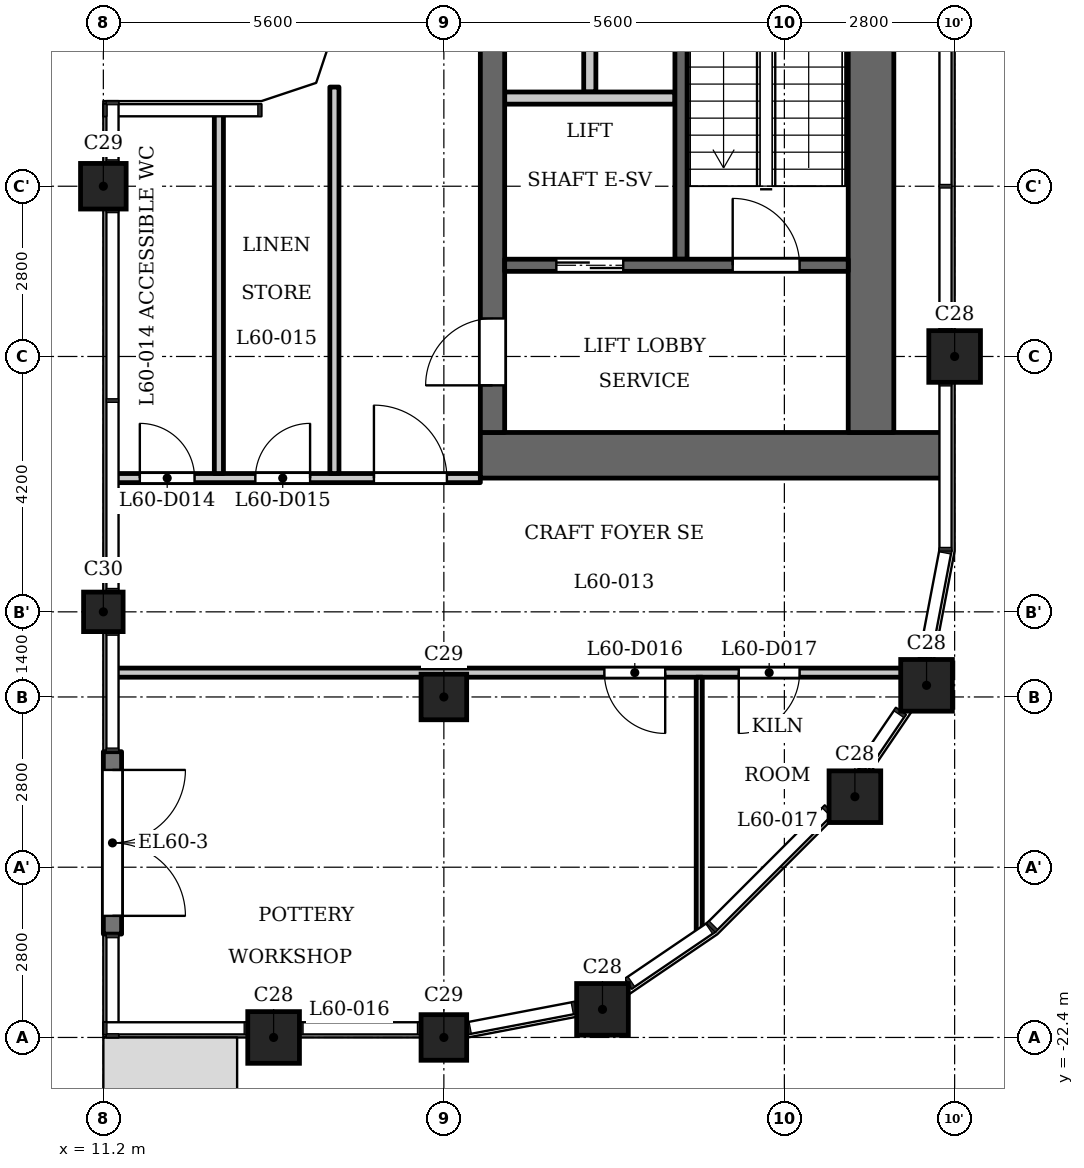
"""IFC4 building model, lengths in metres.
Left out: names, types, materials, properties, quantities, classifications, styles, units other than length and angle.
Written with IfcOpenShell. Run it as: python <this file> out.ifc"""

import sys

from ifc_helpers import new_model, si_unit, direction, frame, frame_2d, origin, origin_2d, place, context, subcontext, project, spatial, polyline, rectangle, outline, extrude, element, fill, save


model = new_model("IFC4")
c1 = context("Model", 3, precision=1e-05, world=origin(), true_north=direction((0.0, 1.0)))
c2 = subcontext(c1, "Body", "Model", "MODEL_VIEW")
j1 = project(units=[si_unit("LENGTHUNIT", "METRE"), si_unit("PLANEANGLEUNIT", "RADIAN")], contexts=[c1])
p1 = place(None, origin())
s1 = spatial("IfcSite", under=j1, at=p1, CompositionType="ELEMENT")
p2 = place(p1, origin())
s2 = spatial("IfcBuilding", under=s1, at=p2, CompositionType="ELEMENT")
p3 = place(p2, frame((0.0, 0.0, 230.9)))
s3 = spatial("IfcBuildingStorey", under=s2, at=p3, CompositionType="ELEMENT", Elevation=230.9)
for number, where, z_axis, x_axis in (
    (1, (14.0, -22.4, 0.0), (0.0, 0.0, 1.0), (1.0, 0.0, 0.0)),
    (2, (19.409, -21.938, 0.0), (0.0, 0.0, 1.0), (1.0, 0.0, 0.0)),
    (3, (23.56, -18.44, 0.0), (0.0, 0.0, 1.0), (1.0, 0.0, 0.0)),
    (4, (24.738, -16.609, 0.0), (0.0, 0.0, 1.0), (1.0, 0.0, 0.0)),
    (5, (25.2, -11.2, 0.0), (0.0, 0.0, 1.0), (1.0, 0.0, 0.0)),
):
    element("IfcColumn", number, at=place(p3, frame(where, z_axis=z_axis, x_axis=x_axis)), inside=s3, PredefinedType="COLUMN", context=c2, shape_type="SweptSolid", body=[
        extrude(rectangle(XDim=0.85, YDim=0.85, at=origin_2d()), origin(), (0.0, 0.0, 1.0), 5.4),
    ])
for number, where, z_axis, x_axis in (
    (6, (16.8, -22.4, 0.0), (0.0, 0.0, 1.0), (1.0, 0.0, 0.0)),
    (7, (16.8, -16.8, 0.0), (0.0, 0.0, 1.0), (1.0, 0.0, 0.0)),
    (8, (11.2, -8.4, 0.0), (0.0, 0.0, 1.0), (1.0, 0.0, 0.0)),
):
    element("IfcColumn", number, at=place(p3, frame(where, z_axis=z_axis, x_axis=x_axis)), inside=s3, PredefinedType="COLUMN", context=c2, shape_type="SweptSolid", body=[
        extrude(rectangle(XDim=0.75, YDim=0.75, at=origin_2d()), origin(), (0.0, 0.0, 1.0), 5.4),
    ])
p4 = place(p3, frame((11.2, -15.4, 0.0), z_axis=(0.0, 0.0, 1.0), x_axis=(1.0, 0.0, 0.0)))
e9 = element("IfcColumn", 9, at=p4, inside=s3, PredefinedType="COLUMN", context=c2, shape_type="SweptSolid", body=[
    extrude(rectangle(XDim=0.65, YDim=0.65, at=origin_2d()), origin(), (0.0, 0.0, 1.0), 5.4),
])
p5 = place(p3, frame((11.35, -17.7, 0.0), z_axis=(0.0, 0.0, 1.0), x_axis=(0.0, -1.0, 0.0)))
e10 = element("IfcWall", 10, at=p5, inside=s3, PredefinedType="SOLIDWALL", context=c2, shape_type="SweptSolid", body=[
    extrude(rectangle(XDim=3.0, YDim=0.3, at=frame_2d((1.5, 0.0))), origin(), (0.0, 0.0, 1.0), 4.95),
])
p6 = place(p5, frame((0.3, 0.0, 0.0)))
e11 = element("IfcOpeningElement", 11, at=p6, cuts=e10, PredefinedType="OPENING", context=c2, shape_type="SweptSolid", body=[
    extrude(rectangle(XDim=2.4, YDim=2.3, at=frame_2d((1.2, 1.15))), frame((0.0, 0.16, 0.0), z_axis=(0.0, -1.0, 0.0), x_axis=(1.0, 0.0, 0.0)), (0.0, 0.0, 1.0), 0.32),
])
p7 = place(p3, frame((20.7, -9.6, 0.0), z_axis=(0.0, 0.0, 1.0), x_axis=(0.0, 1.0, 0.0)))
e12 = element("IfcWall", 12, at=p7, inside=s3, PredefinedType="SHEAR", context=c2, shape_type="SweptSolid", body=[
    extrude(rectangle(XDim=9.75, YDim=0.2, at=frame_2d((4.875, 0.0))), origin(), (0.0, 0.0, 1.0), 4.95),
])
p8 = place(p3, frame((17.4, -12.825, 0.0), z_axis=(0.0, 0.0, 1.0), x_axis=(1.0, 0.0, 0.0)))
e13 = element("IfcWall", 13, at=p8, inside=s3, PredefinedType="SHEAR", context=c2, shape_type="SweptSolid", body=[
    extrude(rectangle(XDim=7.6, YDim=0.75, at=frame_2d((3.8, 0.0))), origin(), (0.0, 0.0, 1.0), 4.95),
])
p9 = place(p3, frame((19.2, -6.85, 0.0), z_axis=(0.0, 0.0, 1.0), x_axis=(0.0, 1.0, 0.0)))
e14 = element("IfcWall", 14, at=p9, inside=s3, PredefinedType="PARTITIONING", context=c2, shape_type="SweptSolid", body=[
    extrude(rectangle(XDim=7.0, YDim=0.2, at=frame_2d((3.5, 0.0))), origin(), (0.0, 0.0, 1.0), 4.95),
])
p10 = place(p3, frame((17.6, -12.45, 0.0), z_axis=(0.0, 0.0, 1.0), x_axis=(0.0, 1.0, 0.0)))
e15 = element("IfcWall", 15, at=p10, inside=s3, PredefinedType="SHEAR", context=c2, shape_type="SweptSolid", body=[
    extrude(rectangle(XDim=24.9, YDim=0.4, at=frame_2d((12.45, 0.0))), origin(), (0.0, 0.0, 1.0), 4.95),
])
p11 = place(p10, frame((8.65, 0.0, 0.0)))
e16 = element("IfcOpeningElement", 16, at=p11, cuts=e15, PredefinedType="OPENING", context=c2, shape_type="SweptSolid", body=[
    extrude(rectangle(XDim=0.9, YDim=2.1, at=frame_2d((0.45, 1.05))), frame((0.0, 0.21, 0.0), z_axis=(0.0, -1.0, 0.0), x_axis=(1.0, 0.0, 0.0)), (0.0, 0.0, 1.0), 0.42),
])
p12 = place(p10, frame((15.6, 0.0, 0.0)))
e17 = element("IfcOpeningElement", 17, at=p12, cuts=e15, PredefinedType="OPENING", context=c2, shape_type="SweptSolid", body=[
    extrude(rectangle(XDim=1.1, YDim=2.1, at=frame_2d((0.55, 1.05))), frame((0.0, 0.21, 0.0), z_axis=(0.0, -1.0, 0.0), x_axis=(1.0, 0.0, 0.0)), (0.0, 0.0, 1.0), 0.42),
])
p13 = place(p10, frame((18.0, 0.0, 0.0)))
e18 = element("IfcOpeningElement", 18, at=p13, cuts=e15, PredefinedType="OPENING", context=c2, shape_type="SweptSolid", body=[
    extrude(rectangle(XDim=1.1, YDim=2.1, at=frame_2d((0.55, 1.05))), frame((0.0, 0.21, 0.0), z_axis=(0.0, -1.0, 0.0), x_axis=(1.0, 0.0, 0.0)), (0.0, 0.0, 1.0), 0.42),
])
p14 = place(p10, frame((23.025, 0.0, 0.0)))
e19 = element("IfcOpeningElement", 19, at=p14, cuts=e15, PredefinedType="OPENING", context=c2, shape_type="SweptSolid", body=[
    extrude(rectangle(XDim=1.1, YDim=2.1, at=frame_2d((0.55, 1.05))), frame((0.0, 0.21, 0.0), z_axis=(0.0, -1.0, 0.0), x_axis=(1.0, 0.0, 0.0)), (0.0, 0.0, 1.0), 0.42),
])
p15 = place(p10, frame((0.775, 0.0, 0.0)))
e20 = element("IfcOpeningElement", 20, at=p15, cuts=e15, PredefinedType="OPENING", context=c2, shape_type="SweptSolid", body=[
    extrude(rectangle(XDim=1.1, YDim=2.1, at=frame_2d((0.55, 1.05))), frame((0.0, 0.21, 0.0), z_axis=(0.0, -1.0, 0.0), x_axis=(1.0, 0.0, 0.0)), (0.0, 0.0, 1.0), 0.42),
])
p16 = place(p10, frame((12.925, 0.0, 0.0)))
e21 = element("IfcOpeningElement", 21, at=p16, cuts=e15, PredefinedType="OPENING", context=c2, shape_type="SweptSolid", body=[
    extrude(rectangle(XDim=1.8, YDim=2.1, at=frame_2d((0.9, 1.05))), frame((0.0, 0.21, 0.0), z_axis=(0.0, -1.0, 0.0), x_axis=(1.0, 0.0, 0.0)), (0.0, 0.0, 1.0), 0.42),
])
p17 = place(p3, frame((23.825, -12.45, 0.0), z_axis=(0.0, 0.0, 1.0), x_axis=(0.0, 1.0, 0.0)))
e22 = element("IfcWall", 22, at=p17, inside=s3, PredefinedType="SHEAR", context=c2, shape_type="SweptSolid", body=[
    extrude(rectangle(XDim=24.9, YDim=0.75, at=frame_2d((12.45, 0.0))), origin(), (0.0, 0.0, 1.0), 4.95),
])
p18 = place(p3, frame((17.8, -9.7, 0.0), z_axis=(0.0, 0.0, 1.0), x_axis=(1.0, 0.0, 0.0)))
e23 = element("IfcWall", 23, at=p18, inside=s3, PredefinedType="SHEAR", context=c2, shape_type="SweptSolid", body=[
    extrude(rectangle(XDim=5.65, YDim=0.2, at=frame_2d((2.825, 0.0))), origin(), (0.0, 0.0, 1.0), 4.95),
])
p19 = place(p18, frame((0.85, 0.0, 0.0)))
e24 = element("IfcOpeningElement", 24, at=p19, cuts=e23, PredefinedType="OPENING", context=c2, shape_type="SweptSolid", body=[
    extrude(rectangle(XDim=1.1, YDim=2.1, at=frame_2d((0.55, 1.05))), frame((0.0, 0.11, 0.0), z_axis=(0.0, -1.0, 0.0), x_axis=(1.0, 0.0, 0.0)), (0.0, 0.0, 1.0), 0.22),
])
p20 = place(p18, frame((3.75, 0.0, 0.0)))
e25 = element("IfcOpeningElement", 25, at=p20, cuts=e23, PredefinedType="OPENING", context=c2, shape_type="SweptSolid", body=[
    extrude(rectangle(XDim=1.1, YDim=2.1, at=frame_2d((0.55, 1.05))), frame((0.0, 0.11, 0.0), z_axis=(0.0, -1.0, 0.0), x_axis=(1.0, 0.0, 0.0)), (0.0, 0.0, 1.0), 0.22),
])
p21 = place(p3, frame((17.8, -6.95, 0.0), z_axis=(0.0, 0.0, 1.0), x_axis=(1.0, 0.0, 0.0)))
e26 = element("IfcWall", 26, at=p21, inside=s3, PredefinedType="PARTITIONING", context=c2, shape_type="SweptSolid", body=[
    extrude(rectangle(XDim=2.8, YDim=0.2, at=frame_2d((1.4, 0.0))), origin(), (0.0, 0.0, 1.0), 4.95),
])
p22 = place(p3, frame((11.384, -16.4, 0.0), z_axis=(0.0, 0.0, 1.0), x_axis=(1.0, 0.0, 0.0)))
e27 = element("IfcWall", 27, at=p22, inside=s3, PredefinedType="PARTITIONING", context=c2, shape_type="SweptSolid", body=[
    extrude(rectangle(XDim=13.336, YDim=0.15, at=frame_2d((6.668, 0.0))), origin(), (0.0, 0.0, 1.0), 4.95),
])
p23 = place(p22, frame((8.056, 0.0, 0.0)))
e28 = element("IfcOpeningElement", 28, at=p23, cuts=e27, PredefinedType="OPENING", context=c2, shape_type="SweptSolid", body=[
    extrude(rectangle(XDim=1.0, YDim=2.1, at=frame_2d((0.5, 1.05))), frame((0.0, 0.085, 0.0), z_axis=(0.0, -1.0, 0.0), x_axis=(1.0, 0.0, 0.0)), (0.0, 0.0, 1.0), 0.17),
])
p24 = place(p22, frame((10.266, 0.0, 0.0)))
e29 = element("IfcOpeningElement", 29, at=p24, cuts=e27, PredefinedType="OPENING", context=c2, shape_type="SweptSolid", body=[
    extrude(rectangle(XDim=1.0, YDim=2.1, at=frame_2d((0.5, 1.05))), frame((0.0, 0.085, 0.0), z_axis=(0.0, -1.0, 0.0), x_axis=(1.0, 0.0, 0.0)), (0.0, 0.0, 1.0), 0.17),
])
p25 = place(p3, frame((11.384, -13.2, 0.0), z_axis=(0.0, 0.0, 1.0), x_axis=(1.0, 0.0, 0.0)))
e30 = element("IfcWall", 30, at=p25, inside=s3, PredefinedType="PARTITIONING", context=c2, shape_type="SweptSolid", body=[
    extrude(rectangle(XDim=6.016, YDim=0.15, at=frame_2d((3.008, 0.0))), origin(), (0.0, 0.0, 1.0), 4.95),
])
p26 = place(p25, frame((4.266, 0.0, 0.0)))
e31 = element("IfcOpeningElement", 31, at=p26, cuts=e30, PredefinedType="OPENING", context=c2, shape_type="SweptSolid", body=[
    extrude(rectangle(XDim=1.2, YDim=2.1, at=frame_2d((0.6, 1.05))), frame((0.0, 0.085, 0.0), z_axis=(0.0, -1.0, 0.0), x_axis=(1.0, 0.0, 0.0)), (0.0, 0.0, 1.0), 0.17),
])
p27 = place(p25, frame((0.416, 0.0, 0.0)))
e32 = element("IfcOpeningElement", 32, at=p27, cuts=e30, PredefinedType="OPENING", context=c2, shape_type="SweptSolid", body=[
    extrude(rectangle(XDim=0.9, YDim=2.1, at=frame_2d((0.45, 1.05))), frame((0.0, 0.085, 0.0), z_axis=(0.0, -1.0, 0.0), x_axis=(1.0, 0.0, 0.0)), (0.0, 0.0, 1.0), 0.17),
])
p28 = place(p25, frame((2.316, 0.0, 0.0)))
e33 = element("IfcOpeningElement", 33, at=p28, cuts=e30, PredefinedType="OPENING", context=c2, shape_type="SweptSolid", body=[
    extrude(rectangle(XDim=0.9, YDim=2.1, at=frame_2d((0.45, 1.05))), frame((0.0, 0.085, 0.0), z_axis=(0.0, -1.0, 0.0), x_axis=(1.0, 0.0, 0.0)), (0.0, 0.0, 1.0), 0.17),
])
p29 = place(p3, frame((13.1, -13.125, 0.0), z_axis=(0.0, 0.0, 1.0), x_axis=(0.0, 1.0, 0.0)))
e34 = element("IfcWall", 34, at=p29, inside=s3, PredefinedType="PARTITIONING", context=c2, shape_type="SweptSolid", body=[
    extrude(rectangle(XDim=5.941, YDim=0.15, at=frame_2d((2.97, 0.0))), origin(), (0.0, 0.0, 1.0), 4.95),
])
p30 = place(p3, frame((15.0, -13.125, 0.0), z_axis=(0.0, 0.0, 1.0), x_axis=(0.0, 1.0, 0.0)))
e35 = element("IfcWall", 35, at=p30, inside=s3, PredefinedType="PARTITIONING", context=c2, shape_type="SweptSolid", body=[
    extrude(rectangle(XDim=6.356, YDim=0.15, at=frame_2d((3.178, 0.0))), origin(), (0.0, 0.0, 1.0), 4.95),
])
p31 = place(p3, frame((21.0, -20.687, 0.0), z_axis=(0.0, 0.0, 1.0), x_axis=(0.0, 1.0, 0.0)))
e36 = element("IfcWall", 36, at=p31, inside=s3, PredefinedType="PARTITIONING", context=c2, shape_type="SweptSolid", body=[
    extrude(rectangle(XDim=4.211, YDim=0.1, at=frame_2d((2.106, 0.0))), origin(), (0.0, 0.0, 1.0), 4.95),
])
p32 = place(p3, origin())
e37 = element("IfcWall", 37, at=p32, inside=s3, PredefinedType="SOLIDWALL", context=c2, shape_type="SweptSolid", body=[
    extrude(outline(polyline([(15.0, -5.8), (14.7, -6.7), (13.8, -7.0), (13.8, -7.3), (13.849, -7.3), (14.937, -6.937), (15.3, -5.849), (15.3, -5.8), (15.0, -5.8)])), origin(), (0.0, 0.0, 1.0), 4.95),
])
p33 = place(p6, origin())
e38 = element("IfcDoor", 38, at=p33, inside=s3, OperationType="SINGLE_SWING_LEFT", PredefinedType="DOOR", context=c2, shape_type="SweptSolid", body=[
    extrude(rectangle(XDim=2.4, YDim=2.3, at=frame_2d((1.2, 1.15))), frame((0.0, 0.025, 0.0), z_axis=(0.0, -1.0, 0.0), x_axis=(1.0, 0.0, 0.0)), (0.0, 0.0, 1.0), 0.05),
])
fill(e11, e38)
p34 = place(p19, origin())
e39 = element("IfcDoor", 39, at=p34, inside=s3, OperationType="DOUBLE_DOOR_SLIDING", PredefinedType="DOOR", context=c2, shape_type="SweptSolid", body=[
    extrude(rectangle(XDim=1.1, YDim=2.1, at=frame_2d((0.55, 1.05))), frame((0.0, 0.025, 0.0), z_axis=(0.0, -1.0, 0.0), x_axis=(1.0, 0.0, 0.0)), (0.0, 0.0, 1.0), 0.05),
])
fill(e24, e39)
p35 = place(p15, origin())
e40 = element("IfcDoor", 40, at=p35, inside=s3, OperationType="SINGLE_SWING_RIGHT", PredefinedType="DOOR", context=c2, shape_type="SweptSolid", body=[
    extrude(rectangle(XDim=1.1, YDim=2.1, at=frame_2d((0.55, 1.05))), frame((0.0, 0.025, 0.0), z_axis=(0.0, -1.0, 0.0), x_axis=(1.0, 0.0, 0.0)), (0.0, 0.0, 1.0), 0.05),
])
fill(e20, e40)
p36 = place(p20, origin())
e41 = element("IfcDoor", 41, at=p36, inside=s3, OperationType="SINGLE_SWING_RIGHT", PredefinedType="DOOR", context=c2, shape_type="SweptSolid", body=[
    extrude(rectangle(XDim=1.1, YDim=2.1, at=frame_2d((0.55, 1.05))), frame((0.0, 0.025, 0.0), z_axis=(0.0, -1.0, 0.0), x_axis=(1.0, 0.0, 0.0)), (0.0, 0.0, 1.0), 0.05),
])
fill(e25, e41)
p37 = place(p26, origin())
e42 = element("IfcDoor", 42, at=p37, inside=s3, OperationType="SINGLE_SWING_RIGHT", PredefinedType="DOOR", context=c2, shape_type="SweptSolid", body=[
    extrude(rectangle(XDim=1.2, YDim=2.1, at=frame_2d((0.6, 1.05))), frame((0.0, 0.025, 0.0), z_axis=(0.0, -1.0, 0.0), x_axis=(1.0, 0.0, 0.0)), (0.0, 0.0, 1.0), 0.05),
])
fill(e31, e42)
p38 = place(p27, origin())
e43 = element("IfcDoor", 43, at=p38, inside=s3, OperationType="SINGLE_SWING_RIGHT", PredefinedType="DOOR", context=c2, shape_type="SweptSolid", body=[
    extrude(rectangle(XDim=0.9, YDim=2.1, at=frame_2d((0.45, 1.05))), frame((0.0, 0.025, 0.0), z_axis=(0.0, -1.0, 0.0), x_axis=(1.0, 0.0, 0.0)), (0.0, 0.0, 1.0), 0.05),
])
fill(e32, e43)
p39 = place(p28, origin())
e44 = element("IfcDoor", 44, at=p39, inside=s3, OperationType="SINGLE_SWING_LEFT", PredefinedType="DOOR", context=c2, shape_type="SweptSolid", body=[
    extrude(rectangle(XDim=0.9, YDim=2.1, at=frame_2d((0.45, 1.05))), frame((0.0, 0.025, 0.0), z_axis=(0.0, -1.0, 0.0), x_axis=(1.0, 0.0, 0.0)), (0.0, 0.0, 1.0), 0.05),
])
fill(e33, e44)
p40 = place(p23, origin())
e45 = element("IfcDoor", 45, at=p40, inside=s3, OperationType="SINGLE_SWING_RIGHT", PredefinedType="DOOR", context=c2, shape_type="SweptSolid", body=[
    extrude(rectangle(XDim=1.0, YDim=2.1, at=frame_2d((0.5, 1.05))), frame((0.0, 0.025, 0.0), z_axis=(0.0, -1.0, 0.0), x_axis=(1.0, 0.0, 0.0)), (0.0, 0.0, 1.0), 0.05),
])
fill(e28, e45)
p41 = place(p24, origin())
e46 = element("IfcDoor", 46, at=p41, inside=s3, OperationType="SINGLE_SWING_LEFT", PredefinedType="DOOR", context=c2, shape_type="SweptSolid", body=[
    extrude(rectangle(XDim=1.0, YDim=2.1, at=frame_2d((0.5, 1.05))), frame((0.0, 0.025, 0.0), z_axis=(0.0, -1.0, 0.0), x_axis=(1.0, 0.0, 0.0)), (0.0, 0.0, 1.0), 0.05),
])
fill(e29, e46)
save(model, sys.argv[1])
